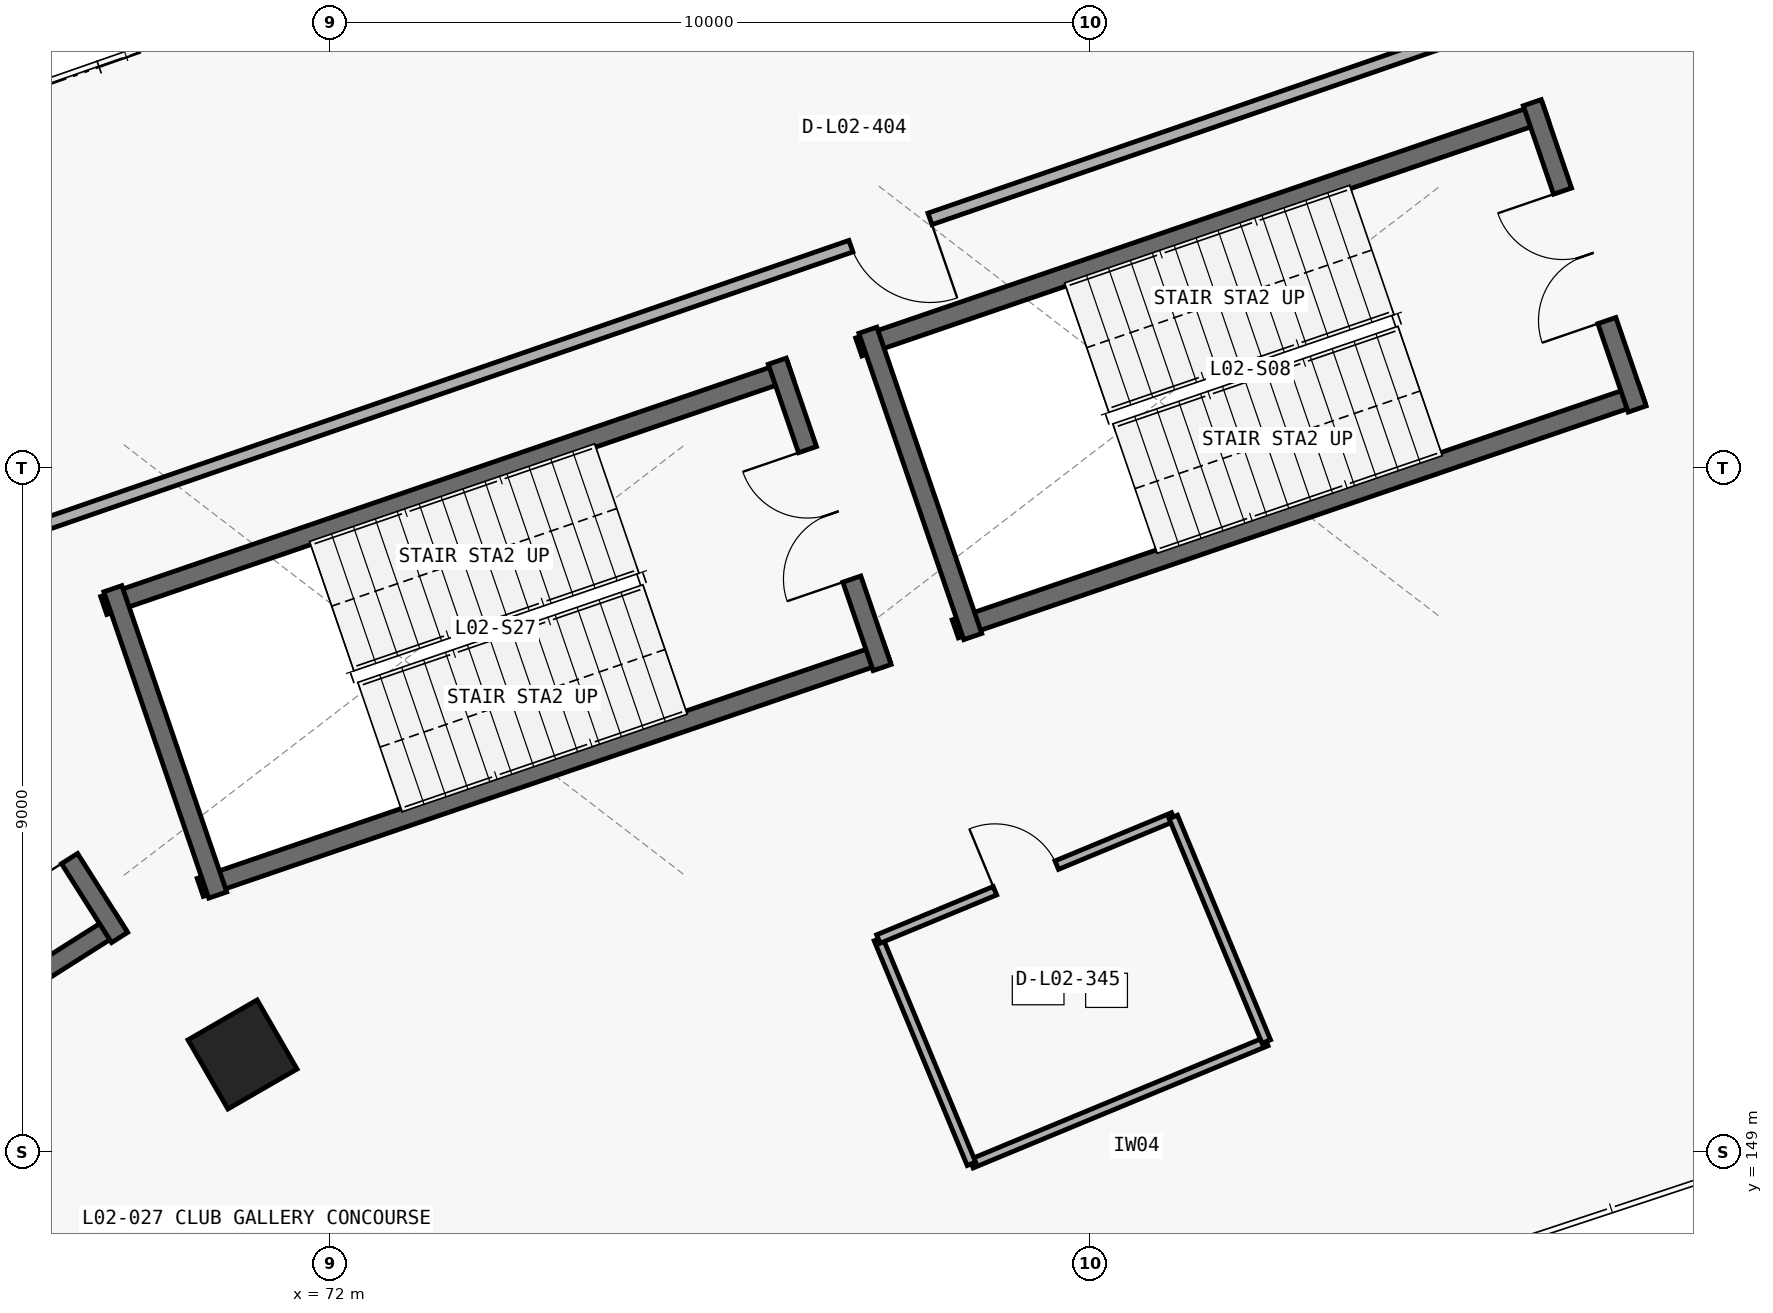
"""IFC4 building model, lengths in metres.
Left out: names, types, materials, properties, quantities, classifications, styles, units other than length and angle.
Written with IfcOpenShell. Run it as: python <this file> out.ifc"""

import sys

from ifc_helpers import new_model, si_unit, direction, frame, frame_2d, origin, origin_2d, place, context, subcontext, project, spatial, rectangle, extrude, element, fill, save


model = new_model("IFC4")
c1 = context("Model", 3, precision=1e-05, world=origin(), true_north=direction((0.0, 1.0)))
c2 = subcontext(c1, "Body", "Model", "MODEL_VIEW")
j1 = project(units=[si_unit("LENGTHUNIT", "METRE"), si_unit("PLANEANGLEUNIT", "RADIAN")], contexts=[c1])
p1 = place(None, origin())
s1 = spatial("IfcSite", under=j1, at=p1, CompositionType="ELEMENT")
p2 = place(p1, origin())
s2 = spatial("IfcBuilding", under=s1, at=p2, CompositionType="ELEMENT")
p3 = place(p2, frame((0.0, 0.0, 10.2)))
s3 = spatial("IfcBuildingStorey", under=s2, at=p3, CompositionType="ELEMENT", Elevation=10.2)
p4 = place(p3, frame((70.85, 150.284, 0.0), z_axis=(0.0, 0.0, 1.0), x_axis=(-0.5, 0.866025403784, 0.0)))
e1 = element("IfcColumn", 1, at=p4, inside=s3, PredefinedType="COLUMN", context=c2, shape_type="SweptSolid", body=[
    extrude(rectangle(XDim=1.05, YDim=1.05, at=origin_2d()), origin(), (0.0, 0.0, 1.0), 4.8),
])
p5 = place(p3, frame((87.993, 162.686, 0.0), z_axis=(0.0, 0.0, 1.0), x_axis=(-0.946064424228, -0.323978556712, 0.0)))
e2 = element("IfcWall", 2, at=p5, inside=s3, PredefinedType="SHEAR", context=c2, shape_type="SweptSolid", body=[
    extrude(rectangle(XDim=9.55, YDim=0.25, at=frame_2d((4.775, 0.0))), origin(), (0.0, 0.0, 1.0), 4.5),
])
p6 = place(p3, frame((80.228, 155.883, 0.0), z_axis=(0.0, 0.0, 1.0), x_axis=(0.946067107432, 0.323970721263, 0.0)))
e3 = element("IfcWall", 3, at=p6, inside=s3, PredefinedType="SHEAR", context=c2, shape_type="SweptSolid", body=[
    extrude(rectangle(XDim=9.55, YDim=0.25, at=frame_2d((4.775, 0.0))), origin(), (0.0, 0.0, 1.0), 4.5),
])
p7 = place(p3, frame((89.199, 158.776, 0.0), z_axis=(0.0, 0.0, 1.0), x_axis=(-0.323988758717, 0.946060930504, 0.0)))
e4 = element("IfcWall", 4, at=p7, inside=s3, PredefinedType="SHEAR", context=c2, shape_type="SweptSolid", body=[
    extrude(rectangle(XDim=4.26, YDim=0.25, at=frame_2d((2.13, 0.0))), origin(), (0.0, 0.0, 1.0), 4.5),
])
p8 = place(p7, frame((1.23, 0.0, 0.0)))
e5 = element("IfcOpeningElement", 5, at=p8, cuts=e4, PredefinedType="OPENING", context=c2, shape_type="SweptSolid", body=[
    extrude(rectangle(XDim=1.8, YDim=2.25, at=frame_2d((0.9, 1.125))), frame((0.0, 0.135, 0.0), z_axis=(0.0, -1.0, 0.0), x_axis=(1.0, 0.0, 0.0)), (0.0, 0.0, 1.0), 0.27),
])
p9 = place(p3, frame((79.078, 159.812, 0.0), z_axis=(0.0, 0.0, 1.0), x_axis=(0.323971192516, -0.946066946056, 0.0)))
e6 = element("IfcWall", 6, at=p9, inside=s3, PredefinedType="SHEAR", context=c2, shape_type="SweptSolid", body=[
    extrude(rectangle(XDim=4.26, YDim=0.25, at=frame_2d((2.13, 0.0))), origin(), (0.0, 0.0, 1.0), 4.5),
])
p10 = place(p3, frame((61.183, 146.917, 0.0), z_axis=(0.0, 0.0, 1.0), x_axis=(0.844391246241, 0.535727004427, 0.0)))
e7 = element("IfcWall", 7, at=p10, inside=s3, PredefinedType="SHEAR", context=c2, shape_type="SweptSolid", body=[
    extrude(rectangle(XDim=9.55, YDim=0.25, at=frame_2d((4.775, 0.0))), origin(), (0.0, 0.0, 1.0), 4.5),
])
p11 = place(p3, frame((69.233, 151.823, 0.0), z_axis=(0.0, 0.0, 1.0), x_axis=(-0.535684577572, 0.844418162613, 0.0)))
e8 = element("IfcWall", 8, at=p11, inside=s3, PredefinedType="SHEAR", context=c2, shape_type="SweptSolid", body=[
    extrude(rectangle(XDim=4.26, YDim=0.25, at=frame_2d((2.13, 0.0))), origin(), (0.0, 0.0, 1.0), 4.5),
])
p12 = place(p11, frame((1.23, 0.0, 0.0)))
e9 = element("IfcOpeningElement", 9, at=p12, cuts=e8, PredefinedType="OPENING", context=c2, shape_type="SweptSolid", body=[
    extrude(rectangle(XDim=1.8, YDim=2.25, at=frame_2d((0.9, 1.125))), frame((0.0, 0.135, 0.0), z_axis=(0.0, -1.0, 0.0), x_axis=(1.0, 0.0, 0.0)), (0.0, 0.0, 1.0), 0.27),
])
for number, where, z_axis, x_axis in (
    (10, (78.059, 159.285, 0.0), (0.0, 0.0, 1.0), (-0.946, -0.324, 0.0)),
    (11, (70.294, 152.482, 0.0), (0.0, 0.0, 1.0), (0.946, 0.324, 0.0)),
):
    element("IfcWall", number, at=place(p3, frame(where, z_axis=z_axis, x_axis=x_axis)), inside=s3, PredefinedType="SHEAR", context=c2, shape_type="SweptSolid", body=[
        extrude(rectangle(XDim=9.55, YDim=0.25, at=frame_2d((4.775, 0.0))), origin(), (0.0, 0.0, 1.0), 4.5),
    ])
p13 = place(p3, frame((79.265, 155.375, 0.0), z_axis=(0.0, 0.0, 1.0), x_axis=(-0.323971192516, 0.946066946056, 0.0)))
e12 = element("IfcWall", 12, at=p13, inside=s3, PredefinedType="SHEAR", context=c2, shape_type="SweptSolid", body=[
    extrude(rectangle(XDim=4.26, YDim=0.25, at=frame_2d((2.13, 0.0))), origin(), (0.0, 0.0, 1.0), 4.5),
])
p14 = place(p13, frame((1.23, 0.0, 0.0)))
e13 = element("IfcOpeningElement", 13, at=p14, cuts=e12, PredefinedType="OPENING", context=c2, shape_type="SweptSolid", body=[
    extrude(rectangle(XDim=1.8, YDim=2.25, at=frame_2d((0.9, 1.125))), frame((0.0, 0.135, 0.0), z_axis=(0.0, -1.0, 0.0), x_axis=(1.0, 0.0, 0.0)), (0.0, 0.0, 1.0), 0.27),
])
p15 = place(p3, frame((69.144, 156.411, 0.0), z_axis=(0.0, 0.0, 1.0), x_axis=(0.323988758717, -0.946060930504, 0.0)))
e14 = element("IfcWall", 14, at=p15, inside=s3, PredefinedType="SHEAR", context=c2, shape_type="SweptSolid", body=[
    extrude(rectangle(XDim=4.26, YDim=0.25, at=frame_2d((2.13, 0.0))), origin(), (0.0, 0.0, 1.0), 4.5),
])
p16 = place(p3, frame((84.32, 150.454, 0.0), z_axis=(0.0, 0.0, 1.0), x_axis=(-0.92379928527, -0.38287710892, 0.0)))
e15 = element("IfcWall", 15, at=p16, inside=s3, PredefinedType="PARTITIONING", context=c2, shape_type="SweptSolid", body=[
    extrude(rectangle(XDim=4.2, YDim=0.12, at=frame_2d((2.1, 0.0))), origin(), (0.0, 0.0, 1.0), 3.113),
])
p17 = place(p3, frame((80.44, 148.846, 0.0), z_axis=(0.0, 0.0, 1.0), x_axis=(-0.382425909773, 0.923986159818, 0.0)))
e16 = element("IfcWall", 16, at=p17, inside=s3, PredefinedType="PARTITIONING", context=c2, shape_type="SweptSolid", body=[
    extrude(rectangle(XDim=3.2, YDim=0.12, at=frame_2d((1.6, 0.0))), origin(), (0.0, 0.0, 1.0), 4.48),
])
p18 = place(p3, frame((79.216, 151.803, 0.0), z_axis=(0.0, 0.0, 1.0), x_axis=(0.923893548413, 0.382649593233, 0.0)))
e17 = element("IfcWall", 17, at=p18, inside=s3, PredefinedType="PARTITIONING", context=c2, shape_type="SweptSolid", body=[
    extrude(rectangle(XDim=4.199, YDim=0.12, at=frame_2d((2.1, 0.0))), origin(), (0.0, 0.0, 1.0), 3.113),
])
p19 = place(p18, frame((1.66, 0.0, 0.0)))
e18 = element("IfcOpeningElement", 18, at=p19, cuts=e17, PredefinedType="OPENING", context=c2, shape_type="SweptSolid", body=[
    extrude(rectangle(XDim=0.88, YDim=2.1, at=frame_2d((0.44, 1.05))), frame((0.0, 0.07, 0.0), z_axis=(0.0, -1.0, 0.0), x_axis=(1.0, 0.0, 0.0)), (0.0, 0.0, 1.0), 0.14),
])
p20 = place(p3, frame((83.096, 153.41, 0.0), z_axis=(0.0, 0.0, 1.0), x_axis=(0.382625877527, -0.923903370406, 0.0)))
e19 = element("IfcWall", 19, at=p20, inside=s3, PredefinedType="PARTITIONING", context=c2, shape_type="SweptSolid", body=[
    extrude(rectangle(XDim=3.199, YDim=0.12, at=frame_2d((1.6, 0.0))), origin(), (0.0, 0.0, 1.0), 4.48),
])
p21 = place(p3, frame((88.254, 164.162, 0.0), z_axis=(0.0, 0.0, 1.0), x_axis=(-0.94529233531, -0.326224463834, 0.0)))
e20 = element("IfcWall", 20, at=p21, inside=s3, PredefinedType="PARTITIONING", context=c2, shape_type="SweptSolid", body=[
    extrude(rectangle(XDim=21.948, YDim=0.16, at=frame_2d((10.974, 0.0))), origin(), (0.0, 0.0, 1.0), 3.565),
])
p22 = place(p21, frame((8.843, 0.0, 0.0)))
e21 = element("IfcOpeningElement", 21, at=p22, cuts=e20, PredefinedType="OPENING", context=c2, shape_type="SweptSolid", body=[
    extrude(rectangle(XDim=1.1, YDim=2.15, at=frame_2d((0.55, 1.075))), frame((0.0, 0.09, 0.0), z_axis=(0.0, -1.0, 0.0), x_axis=(1.0, 0.0, 0.0)), (0.0, 0.0, 1.0), 0.18),
])
p23 = place(p8, origin())
e22 = element("IfcDoor", 22, at=p23, inside=s3, OperationType="DOUBLE_DOOR_SINGLE_SWING", PredefinedType="DOOR", context=c2, shape_type="SweptSolid", body=[
    extrude(rectangle(XDim=1.8, YDim=2.25, at=frame_2d((0.9, 1.125))), frame((0.0, 0.025, 0.0), z_axis=(0.0, -1.0, 0.0), x_axis=(1.0, 0.0, 0.0)), (0.0, 0.0, 1.0), 0.05),
])
fill(e5, e22)
p24 = place(p12, origin())
e23 = element("IfcDoor", 23, at=p24, inside=s3, OperationType="DOUBLE_DOOR_SINGLE_SWING", PredefinedType="DOOR", context=c2, shape_type="SweptSolid", body=[
    extrude(rectangle(XDim=1.8, YDim=2.25, at=frame_2d((0.9, 1.125))), frame((0.0, 0.025, 0.0), z_axis=(0.0, -1.0, 0.0), x_axis=(1.0, 0.0, 0.0)), (0.0, 0.0, 1.0), 0.05),
])
fill(e9, e23)
p25 = place(p14, origin())
e24 = element("IfcDoor", 24, at=p25, inside=s3, OperationType="DOUBLE_DOOR_SINGLE_SWING", PredefinedType="DOOR", context=c2, shape_type="SweptSolid", body=[
    extrude(rectangle(XDim=1.8, YDim=2.25, at=frame_2d((0.9, 1.125))), frame((0.0, 0.025, 0.0), z_axis=(0.0, -1.0, 0.0), x_axis=(1.0, 0.0, 0.0)), (0.0, 0.0, 1.0), 0.05),
])
fill(e13, e24)
p26 = place(p19, origin())
e25 = element("IfcDoor", 25, at=p26, inside=s3, OperationType="SINGLE_SWING_LEFT", PredefinedType="DOOR", context=c2, shape_type="SweptSolid", body=[
    extrude(rectangle(XDim=0.88, YDim=2.1, at=frame_2d((0.44, 1.05))), frame((0.0, 0.025, 0.0), z_axis=(0.0, -1.0, 0.0), x_axis=(1.0, 0.0, 0.0)), (0.0, 0.0, 1.0), 0.05),
])
fill(e18, e25)
p27 = place(p22, origin())
e26 = element("IfcDoor", 26, at=p27, inside=s3, OperationType="SINGLE_SWING_LEFT", PredefinedType="DOOR", context=c2, shape_type="SweptSolid", body=[
    extrude(rectangle(XDim=1.1, YDim=2.15, at=frame_2d((0.55, 1.075))), frame((0.0, 0.025, 0.0), z_axis=(0.0, -1.0, 0.0), x_axis=(1.0, 0.0, 0.0)), (0.0, 0.0, 1.0), 0.05),
])
fill(e21, e26)
save(model, sys.argv[1])
